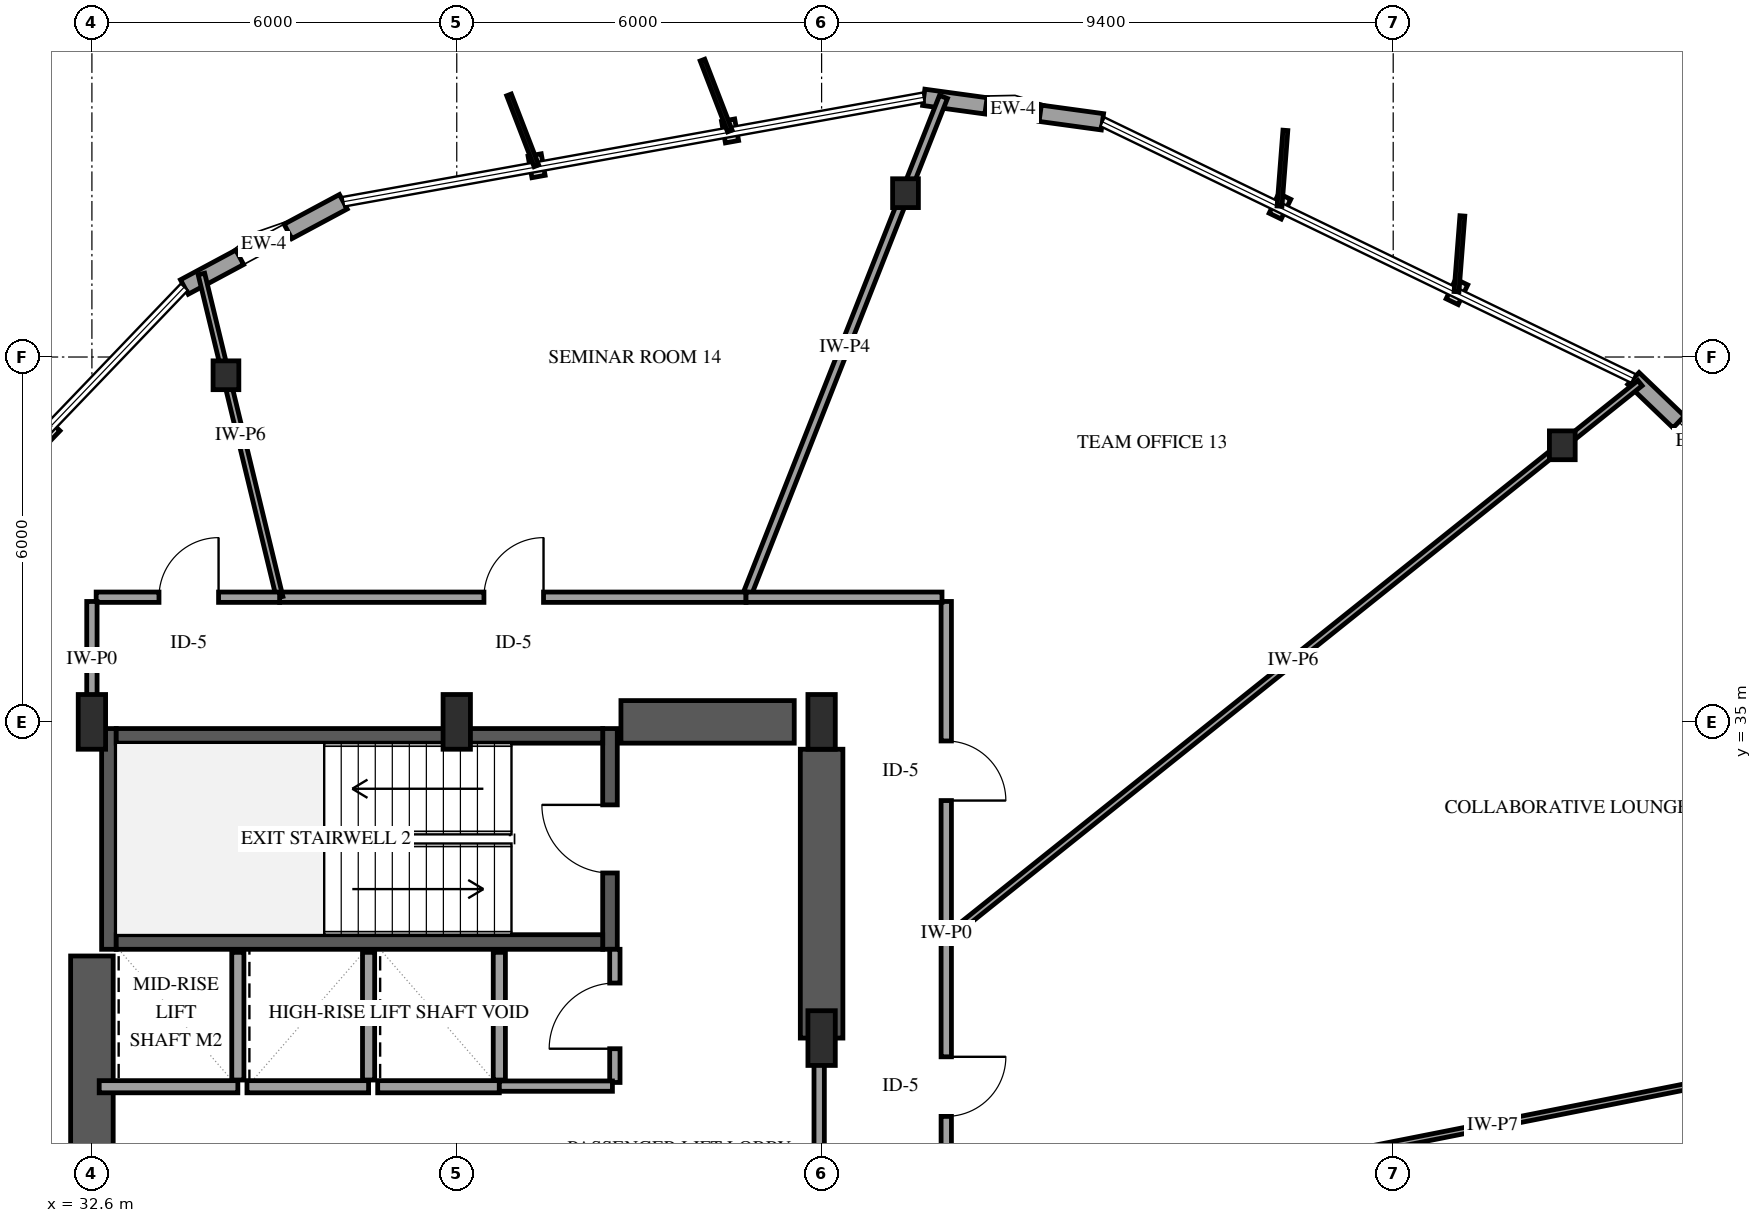
"""IFC4 building model, lengths in metres.
Left out: names, types, materials, properties, quantities, classifications, styles, units other than length and angle.
Written with IfcOpenShell. Run it as: python <this file> out.ifc"""

import sys

from ifc_helpers import new_model, si_unit, direction, frame, frame_2d, origin, origin_2d, place, context, subcontext, project, spatial, rectangle, i_section, extrude, element, fill, save


model = new_model("IFC4")
c1 = context("Model", 3, precision=1e-05, world=origin(), true_north=direction((0.0, 1.0)))
c2 = subcontext(c1, "Body", "Model", "MODEL_VIEW")
j1 = project(units=[si_unit("LENGTHUNIT", "METRE"), si_unit("PLANEANGLEUNIT", "RADIAN")], contexts=[c1])
p1 = place(None, origin())
s1 = spatial("IfcSite", under=j1, at=p1, CompositionType="ELEMENT")
p2 = place(p1, origin())
s2 = spatial("IfcBuilding", under=s1, at=p2, CompositionType="ELEMENT")
p3 = place(p2, frame((0.0, 0.0, 66.6)))
s3 = spatial("IfcBuildingStorey", under=s2, at=p3, CompositionType="ELEMENT", Elevation=66.6)
p4 = place(p3, frame((32.88, 31.26, 0.0), z_axis=(0.0, 0.0, 1.0), x_axis=(0.0, 1.0, 0.0)))
e1 = element("IfcWall", 1, at=p4, inside=s3, PredefinedType="SHEAR", context=c2, shape_type="SweptSolid", body=[
    extrude(rectangle(XDim=3.63, YDim=0.24, at=frame_2d((1.815, 0.0))), origin(), (0.0, 0.0, 1.0), 4.0),
])
p5 = place(p3, frame((41.12, 31.26, 0.0), z_axis=(0.0, 0.0, 1.0), x_axis=(0.0, 1.0, 0.0)))
e2 = element("IfcWall", 2, at=p5, inside=s3, PredefinedType="SHEAR", context=c2, shape_type="SweptSolid", body=[
    extrude(rectangle(XDim=3.63, YDim=0.24, at=frame_2d((1.815, 0.0))), origin(), (0.0, 0.0, 1.0), 4.0),
])
p6 = place(p5, frame((1.255, 0.0, 0.0)))
e3 = element("IfcOpeningElement", 3, at=p6, cuts=e2, PredefinedType="OPENING", context=c2, shape_type="SweptSolid", body=[
    extrude(rectangle(XDim=1.12, YDim=2.15, at=frame_2d((0.56, 1.075))), frame((0.0, 0.13, 0.0), z_axis=(0.0, -1.0, 0.0), x_axis=(1.0, 0.0, 0.0)), (0.0, 0.0, 1.0), 0.26),
])
for number, where, z_axis, x_axis in (
    (4, (33.0, 31.38, 0.0), (0.0, 0.0, 1.0), (1.0, 0.0, 0.0)),
    (5, (33.0, 34.77, 0.0), (0.0, 0.0, 1.0), (1.0, 0.0, 0.0)),
):
    element("IfcWall", number, at=place(p3, frame(where, z_axis=z_axis, x_axis=x_axis)), inside=s3, PredefinedType="SHEAR", context=c2, shape_type="SweptSolid", body=[
        extrude(rectangle(XDim=8.0, YDim=0.24, at=frame_2d((4.0, 0.0))), origin(), (0.0, 0.0, 1.0), 4.0),
    ])
p7 = place(p3, frame((32.6, 18.85, 0.0), z_axis=(0.0, 0.0, 1.0), x_axis=(0.0, 1.0, 0.0)))
e6 = element("IfcWall", 6, at=p7, inside=s3, PredefinedType="SHEAR", context=c2, shape_type="SweptSolid", body=[
    extrude(rectangle(XDim=12.3, YDim=0.7, at=frame_2d((6.15, 0.0))), origin(), (0.0, 0.0, 1.0), 4.0),
])
p8 = place(p3, frame((41.3, 35.0, 0.0), z_axis=(0.0, 0.0, 1.0), x_axis=(1.0, 0.0, 0.0)))
e7 = element("IfcWall", 7, at=p8, inside=s3, PredefinedType="SHEAR", context=c2, shape_type="SweptSolid", body=[
    extrude(rectangle(XDim=2.85, YDim=0.7, at=frame_2d((1.425, 0.0))), origin(), (0.0, 0.0, 1.0), 4.0),
])
p9 = place(p3, frame((44.6, 29.8, 0.0), z_axis=(0.0, 0.0, 1.0), x_axis=(0.0, 1.0, 0.0)))
e8 = element("IfcWall", 8, at=p9, inside=s3, PredefinedType="SHEAR", context=c2, shape_type="SweptSolid", body=[
    extrude(rectangle(XDim=4.75, YDim=0.7, at=frame_2d((2.375, 0.0))), origin(), (0.0, 0.0, 1.0), 4.0),
])
for number, where, z_axis, x_axis in (
    (9, (32.6, 35.0, 0.0), (0.0, 0.0, 1.0), (1.0, 0.0, 0.0)),
    (10, (38.6, 35.0, 0.0), (0.0, 0.0, 1.0), (1.0, 0.0, 0.0)),
    (11, (44.6, 29.8, 0.0), (0.0, 0.0, 1.0), (1.0, 0.0, 0.0)),
    (12, (44.6, 35.0, 0.0), (0.0, 0.0, 1.0), (1.0, 0.0, 0.0)),
):
    element("IfcColumn", number, at=place(p3, frame(where, z_axis=z_axis, x_axis=x_axis)), inside=s3, PredefinedType="PILASTER", context=c2, shape_type="SweptSolid", body=[
        extrude(rectangle(XDim=0.45, YDim=0.9, at=origin_2d()), origin(), (0.0, 0.0, 1.0), 4.0),
    ])
for number, where, z_axis, x_axis in (
    (13, (56.781, 39.548, 0.0), (0.0, 0.0, 1.0), (1.0, 0.0, 0.0)),
    (14, (45.98, 43.694, 0.0), (0.0, 0.0, 1.0), (1.0, 0.0, 0.0)),
    (15, (34.804, 40.7, 0.0), (0.0, 0.0, 1.0), (1.0, 0.0, 0.0)),
):
    element("IfcColumn", number, at=place(p3, frame(where, z_axis=z_axis, x_axis=x_axis)), inside=s3, PredefinedType="COLUMN", context=c2, shape_type="SweptSolid", body=[
        extrude(i_section(OverallWidth=0.424, OverallDepth=0.474, WebThickness=0.048, FlangeThickness=0.077, FilletRadius=0.038, at=origin_2d()), origin(), (0.0, 0.0, 1.0), 4.0),
    ])
p10 = place(p3, frame((60.091, 38.594, 0.0), z_axis=(0.0, 0.0, 1.0), x_axis=(-0.721765475307, 0.69213770209, 0.0)))
e16 = element("IfcWall", 16, at=p10, inside=s3, PredefinedType="SOLIDWALL", context=c2, shape_type="SweptSolid", body=[
    extrude(rectangle(XDim=2.967, YDim=0.27, at=frame_2d((1.483, 0.0))), origin(), (0.0, 0.0, 1.0), 3.079),
])
p11 = place(p10, frame((1.033, 0.0, 0.75)))
e17 = element("IfcOpeningElement", 17, at=p11, cuts=e16, PredefinedType="OPENING", context=c2, shape_type="SweptSolid", body=[
    extrude(rectangle(XDim=0.9, YDim=1.5, at=frame_2d((0.45, 0.75))), frame((0.0, 0.145, 0.0), z_axis=(0.0, -1.0, 0.0), x_axis=(1.0, 0.0, 0.0)), (0.0, 0.0, 1.0), 0.29),
])
p12 = place(p3, frame((49.219, 44.868, 0.0), z_axis=(0.0, 0.0, 1.0), x_axis=(-0.990749365916, 0.13570443595, 0.0)))
e18 = element("IfcWall", 18, at=p12, inside=s3, PredefinedType="SOLIDWALL", context=c2, shape_type="SweptSolid", body=[
    extrude(rectangle(XDim=2.967, YDim=0.27, at=frame_2d((1.483, 0.0))), origin(), (0.0, 0.0, 1.0), 3.079),
])
p13 = place(p12, frame((1.033, 0.0, 0.75)))
e19 = element("IfcOpeningElement", 19, at=p13, cuts=e18, PredefinedType="OPENING", context=c2, shape_type="SweptSolid", body=[
    extrude(rectangle(XDim=0.9, YDim=1.5, at=frame_2d((0.45, 0.75))), frame((0.0, 0.145, 0.0), z_axis=(0.0, -1.0, 0.0), x_axis=(1.0, 0.0, 0.0)), (0.0, 0.0, 1.0), 0.29),
])
p14 = place(p3, frame((36.735, 43.553, 0.0), z_axis=(0.0, 0.0, 1.0), x_axis=(-0.881307407795, -0.47254338739, 0.0)))
e20 = element("IfcWall", 20, at=p14, inside=s3, PredefinedType="SOLIDWALL", context=c2, shape_type="SweptSolid", body=[
    extrude(rectangle(XDim=2.967, YDim=0.27, at=frame_2d((1.483, 0.0))), origin(), (0.0, 0.0, 1.0), 3.079),
])
p15 = place(p14, frame((1.033, 0.0, 0.75)))
e21 = element("IfcOpeningElement", 21, at=p15, cuts=e20, PredefinedType="OPENING", context=c2, shape_type="SweptSolid", body=[
    extrude(rectangle(XDim=0.9, YDim=1.5, at=frame_2d((0.45, 0.75))), frame((0.0, 0.145, 0.0), z_axis=(0.0, -1.0, 0.0), x_axis=(1.0, 0.0, 0.0)), (0.0, 0.0, 1.0), 0.29),
])
p16 = place(p3, frame((32.72, 29.0, 0.0), z_axis=(0.0, 0.0, 1.0), x_axis=(1.0, 0.0, 0.0)))
e22 = element("IfcWall", 22, at=p16, inside=s3, PredefinedType="SOLIDWALL", context=c2, shape_type="SweptSolid", body=[
    extrude(rectangle(XDim=2.28, YDim=0.2, at=frame_2d((1.14, 0.0))), origin(), (0.0, 0.0, 1.0), 3.7),
])
p17 = place(p3, frame((35.0, 29.11, 0.0), z_axis=(0.0, 0.0, 1.0), x_axis=(0.0, 1.0, 0.0)))
e23 = element("IfcWall", 23, at=p17, inside=s3, PredefinedType="SOLIDWALL", context=c2, shape_type="SweptSolid", body=[
    extrude(rectangle(XDim=2.1, YDim=0.2, at=frame_2d((1.05, 0.0))), origin(), (0.0, 0.0, 1.0), 3.7),
])
p18 = place(p3, frame((35.15, 29.0, 0.0), z_axis=(0.0, 0.0, 1.0), x_axis=(1.0, 0.0, 0.0)))
e24 = element("IfcWall", 24, at=p18, inside=s3, PredefinedType="SOLIDWALL", context=c2, shape_type="SweptSolid", body=[
    extrude(rectangle(XDim=2.0, YDim=0.2, at=frame_2d((1.0, 0.0))), origin(), (0.0, 0.0, 1.0), 3.7),
])
p19 = place(p3, frame((37.15, 29.11, 0.0), z_axis=(0.0, 0.0, 1.0), x_axis=(0.0, 1.0, 0.0)))
e25 = element("IfcWall", 25, at=p19, inside=s3, PredefinedType="SOLIDWALL", context=c2, shape_type="SweptSolid", body=[
    extrude(rectangle(XDim=2.1, YDim=0.2, at=frame_2d((1.05, 0.0))), origin(), (0.0, 0.0, 1.0), 3.7),
])
p20 = place(p3, frame((37.3, 29.0, 0.0), z_axis=(0.0, 0.0, 1.0), x_axis=(1.0, 0.0, 0.0)))
e26 = element("IfcWall", 26, at=p20, inside=s3, PredefinedType="SOLIDWALL", context=c2, shape_type="SweptSolid", body=[
    extrude(rectangle(XDim=2.0, YDim=0.2, at=frame_2d((1.0, 0.0))), origin(), (0.0, 0.0, 1.0), 3.7),
])
p21 = place(p3, frame((39.3, 29.11, 0.0), z_axis=(0.0, 0.0, 1.0), x_axis=(0.0, 1.0, 0.0)))
e27 = element("IfcWall", 27, at=p21, inside=s3, PredefinedType="SOLIDWALL", context=c2, shape_type="SweptSolid", body=[
    extrude(rectangle(XDim=2.1, YDim=0.2, at=frame_2d((1.05, 0.0))), origin(), (0.0, 0.0, 1.0), 3.7),
])
p22 = place(p3, frame((46.65, 26.593, 0.0), z_axis=(0.0, 0.0, 1.0), x_axis=(0.980976457062, 0.194126738728, 0.0)))
e28 = element("IfcWall", 28, at=p22, inside=s3, PredefinedType="PARTITIONING", context=c2, shape_type="SweptSolid", body=[
    extrude(rectangle(XDim=18.317, YDim=0.1, at=frame_2d((9.159, 0.0))), origin(), (0.0, 0.0, 1.0), 2.995),
])
p23 = place(p3, frame((46.65, 31.442, 0.0), z_axis=(0.0, 0.0, 1.0), x_axis=(0.780808493208, 0.624770435387, 0.0)))
e29 = element("IfcWall", 29, at=p23, inside=s3, PredefinedType="PARTITIONING", context=c2, shape_type="SweptSolid", body=[
    extrude(rectangle(XDim=14.612, YDim=0.11, at=frame_2d((7.306, 0.0))), origin(), (0.0, 0.0, 1.0), 3.7),
])
p24 = place(p3, frame((43.357, 37.05, 0.0), z_axis=(0.0, 0.0, 1.0), x_axis=(0.367122541211, 0.930172585994, 0.0)))
e30 = element("IfcWall", 30, at=p24, inside=s3, PredefinedType="PARTITIONING", context=c2, shape_type="SweptSolid", body=[
    extrude(rectangle(XDim=8.845, YDim=0.14, at=frame_2d((4.422, 0.0))), origin(), (0.0, 0.0, 1.0), 2.995),
])
p25 = place(p3, frame((35.687, 37.05, 0.0), z_axis=(0.0, 0.0, 1.0), x_axis=(1.0, 0.0, 0.0)))
e31 = element("IfcWall", 31, at=p25, inside=s3, PredefinedType="PARTITIONING", context=c2, shape_type="SweptSolid", body=[
    extrude(rectangle(XDim=7.67, YDim=0.17, at=frame_2d((3.835, 0.0))), origin(), (0.0, 0.0, 1.0), 3.7),
])
p26 = place(p25, frame((3.36, 0.0, 0.0)))
e32 = element("IfcOpeningElement", 32, at=p26, cuts=e31, PredefinedType="OPENING", context=c2, shape_type="SweptSolid", body=[
    extrude(rectangle(XDim=0.98, YDim=2.15, at=frame_2d((0.49, 1.075))), frame((0.0, 0.095, 0.0), z_axis=(0.0, -1.0, 0.0), x_axis=(1.0, 0.0, 0.0)), (0.0, 0.0, 1.0), 0.19),
])
p27 = place(p3, frame((44.56, 29.8, 0.0), z_axis=(0.0, 0.0, 1.0), x_axis=(0.0, -1.0, 0.0)))
e33 = element("IfcWall", 33, at=p27, inside=s3, PredefinedType="PARTITIONING", context=c2, shape_type="SweptSolid", body=[
    extrude(rectangle(XDim=6.91, YDim=0.17, at=frame_2d((3.455, 0.0))), origin(), (0.0, 0.0, 1.0), 2.74),
])
p28 = place(p27, frame((2.915, 0.0, 0.0)))
e34 = element("IfcOpeningElement", 34, at=p28, cuts=e33, PredefinedType="OPENING", context=c2, shape_type="SweptSolid", body=[
    extrude(rectangle(XDim=1.08, YDim=2.15, at=frame_2d((0.54, 1.075))), frame((0.0, 0.095, 0.0), z_axis=(0.0, -1.0, 0.0), x_axis=(1.0, 0.0, 0.0)), (0.0, 0.0, 1.0), 0.19),
])
p29 = place(p3, frame((46.65, 36.98, 0.0), z_axis=(0.0, 0.0, 1.0), x_axis=(0.0, -1.0, 0.0)))
e35 = element("IfcWall", 35, at=p29, inside=s3, PredefinedType="PARTITIONING", context=c2, shape_type="SweptSolid", body=[
    extrude(rectangle(XDim=5.538, YDim=0.17, at=frame_2d((2.769, 0.0))), origin(), (0.0, 0.0, 1.0), 3.7),
])
p30 = place(p29, frame((2.294, 0.0, 0.0)))
e36 = element("IfcOpeningElement", 36, at=p30, cuts=e35, PredefinedType="OPENING", context=c2, shape_type="SweptSolid", body=[
    extrude(rectangle(XDim=0.98, YDim=2.15, at=frame_2d((0.49, 1.075))), frame((0.0, 0.095, 0.0), z_axis=(0.0, -1.0, 0.0), x_axis=(1.0, 0.0, 0.0)), (0.0, 0.0, 1.0), 0.19),
])
p31 = place(p3, frame((35.687, 37.05, 0.0), z_axis=(0.0, 0.0, 1.0), x_axis=(-0.235196214619, 0.97194791045, 0.0)))
e37 = element("IfcWall", 37, at=p31, inside=s3, PredefinedType="PARTITIONING", context=c2, shape_type="SweptSolid", body=[
    extrude(rectangle(XDim=5.468, YDim=0.11, at=frame_2d((2.734, 0.0))), origin(), (0.0, 0.0, 1.0), 2.995),
])
p32 = place(p3, frame((46.65, 31.442, 0.0), z_axis=(0.0, 0.0, 1.0), x_axis=(0.0, -1.0, 0.0)))
e38 = element("IfcWall", 38, at=p32, inside=s3, PredefinedType="PARTITIONING", context=c2, shape_type="SweptSolid", body=[
    extrude(rectangle(XDim=4.849, YDim=0.17, at=frame_2d((2.424, 0.0))), origin(), (0.0, 0.0, 1.0), 3.7),
])
p33 = place(p32, frame((1.95, 0.0, 0.0)))
e39 = element("IfcOpeningElement", 39, at=p33, cuts=e38, PredefinedType="OPENING", context=c2, shape_type="SweptSolid", body=[
    extrude(rectangle(XDim=0.98, YDim=2.15, at=frame_2d((0.49, 1.075))), frame((0.0, 0.095, 0.0), z_axis=(0.0, -1.0, 0.0), x_axis=(1.0, 0.0, 0.0)), (0.0, 0.0, 1.0), 0.19),
])
p34 = place(p3, frame((43.357, 37.05, 0.0), z_axis=(0.0, 0.0, 1.0), x_axis=(1.0, 0.0, 0.0)))
e40 = element("IfcWall", 40, at=p34, inside=s3, PredefinedType="PARTITIONING", context=c2, shape_type="SweptSolid", body=[
    extrude(rectangle(XDim=3.223, YDim=0.17, at=frame_2d((1.612, 0.0))), origin(), (0.0, 0.0, 1.0), 3.7),
])
p35 = place(p3, frame((32.67, 37.05, 0.0), z_axis=(0.0, 0.0, 1.0), x_axis=(1.0, 0.0, 0.0)))
e41 = element("IfcWall", 41, at=p35, inside=s3, PredefinedType="PARTITIONING", context=c2, shape_type="SweptSolid", body=[
    extrude(rectangle(XDim=3.017, YDim=0.17, at=frame_2d((1.509, 0.0))), origin(), (0.0, 0.0, 1.0), 3.7),
])
p36 = place(p35, frame((1.033, 0.0, 0.0)))
e42 = element("IfcOpeningElement", 42, at=p36, cuts=e41, PredefinedType="OPENING", context=c2, shape_type="SweptSolid", body=[
    extrude(rectangle(XDim=0.98, YDim=2.15, at=frame_2d((0.49, 1.075))), frame((0.0, 0.095, 0.0), z_axis=(0.0, -1.0, 0.0), x_axis=(1.0, 0.0, 0.0)), (0.0, 0.0, 1.0), 0.19),
])
p37 = place(p3, frame((41.2, 29.07, 0.0), z_axis=(0.0, 0.0, 1.0), x_axis=(0.0, 1.0, 0.0)))
e43 = element("IfcWall", 43, at=p37, inside=s3, PredefinedType="PARTITIONING", context=c2, shape_type="SweptSolid", body=[
    extrude(rectangle(XDim=2.19, YDim=0.17, at=frame_2d((1.095, 0.0))), origin(), (0.0, 0.0, 1.0), 3.7),
])
p38 = place(p37, frame((0.555, 0.0, 0.0)))
e44 = element("IfcOpeningElement", 44, at=p38, cuts=e43, PredefinedType="OPENING", context=c2, shape_type="SweptSolid", body=[
    extrude(rectangle(XDim=1.08, YDim=2.15, at=frame_2d((0.54, 1.075))), frame((0.0, 0.095, 0.0), z_axis=(0.0, -1.0, 0.0), x_axis=(1.0, 0.0, 0.0)), (0.0, 0.0, 1.0), 0.19),
])
p39 = place(p3, frame((32.6, 35.07, 0.0), z_axis=(0.0, 0.0, 1.0), x_axis=(0.0, 1.0, 0.0)))
e45 = element("IfcWall", 45, at=p39, inside=s3, PredefinedType="PARTITIONING", context=c2, shape_type="SweptSolid", body=[
    extrude(rectangle(XDim=1.91, YDim=0.17, at=frame_2d((0.955, 0.0))), origin(), (0.0, 0.0, 1.0), 3.7),
])
p40 = place(p3, frame((39.3, 29.01, 0.0), z_axis=(0.0, 0.0, 1.0), x_axis=(1.0, 0.0, 0.0)))
e46 = element("IfcWall", 46, at=p40, inside=s3, PredefinedType="PARTITIONING", context=c2, shape_type="SweptSolid", body=[
    extrude(rectangle(XDim=1.86, YDim=0.17, at=frame_2d((0.93, 0.0))), origin(), (0.0, 0.0, 1.0), 3.7),
])
p41 = place(p11, origin())
e47 = element("IfcWindow", 47, at=p41, inside=s3, PartitioningType="SINGLE_PANEL", PredefinedType="WINDOW", context=c2, shape_type="SweptSolid", body=[
    extrude(rectangle(XDim=0.9, YDim=1.5, at=frame_2d((0.45, 0.75))), frame((0.0, 0.03, 0.0), z_axis=(0.0, -1.0, 0.0), x_axis=(1.0, 0.0, 0.0)), (0.0, 0.0, 1.0), 0.06),
])
fill(e17, e47)
p42 = place(p13, origin())
e48 = element("IfcWindow", 48, at=p42, inside=s3, PartitioningType="SINGLE_PANEL", PredefinedType="WINDOW", context=c2, shape_type="SweptSolid", body=[
    extrude(rectangle(XDim=0.9, YDim=1.5, at=frame_2d((0.45, 0.75))), frame((0.0, 0.03, 0.0), z_axis=(0.0, -1.0, 0.0), x_axis=(1.0, 0.0, 0.0)), (0.0, 0.0, 1.0), 0.06),
])
fill(e19, e48)
p43 = place(p15, origin())
e49 = element("IfcWindow", 49, at=p43, inside=s3, PartitioningType="SINGLE_PANEL", PredefinedType="WINDOW", context=c2, shape_type="SweptSolid", body=[
    extrude(rectangle(XDim=0.9, YDim=1.5, at=frame_2d((0.45, 0.75))), frame((0.0, 0.03, 0.0), z_axis=(0.0, -1.0, 0.0), x_axis=(1.0, 0.0, 0.0)), (0.0, 0.0, 1.0), 0.06),
])
fill(e21, e49)
p44 = place(p6, origin())
e50 = element("IfcDoor", 50, at=p44, inside=s3, OperationType="SINGLE_SWING_RIGHT", PredefinedType="DOOR", context=c2, shape_type="SweptSolid", body=[
    extrude(rectangle(XDim=1.12, YDim=2.15, at=frame_2d((0.56, 1.075))), frame((0.0, 0.025, 0.0), z_axis=(0.0, -1.0, 0.0), x_axis=(1.0, 0.0, 0.0)), (0.0, 0.0, 1.0), 0.05),
])
fill(e3, e50)
p45 = place(p26, origin())
e51 = element("IfcDoor", 51, at=p45, inside=s3, OperationType="SINGLE_SWING_RIGHT", PredefinedType="DOOR", context=c2, shape_type="SweptSolid", body=[
    extrude(rectangle(XDim=0.98, YDim=2.15, at=frame_2d((0.49, 1.075))), frame((0.0, 0.025, 0.0), z_axis=(0.0, -1.0, 0.0), x_axis=(1.0, 0.0, 0.0)), (0.0, 0.0, 1.0), 0.05),
])
fill(e32, e51)
p46 = place(p30, origin())
e52 = element("IfcDoor", 52, at=p46, inside=s3, OperationType="SINGLE_SWING_RIGHT", PredefinedType="DOOR", context=c2, shape_type="SweptSolid", body=[
    extrude(rectangle(XDim=0.98, YDim=2.15, at=frame_2d((0.49, 1.075))), frame((0.0, 0.025, 0.0), z_axis=(0.0, -1.0, 0.0), x_axis=(1.0, 0.0, 0.0)), (0.0, 0.0, 1.0), 0.05),
])
fill(e36, e52)
p47 = place(p33, origin())
e53 = element("IfcDoor", 53, at=p47, inside=s3, OperationType="SINGLE_SWING_LEFT", PredefinedType="DOOR", context=c2, shape_type="SweptSolid", body=[
    extrude(rectangle(XDim=0.98, YDim=2.15, at=frame_2d((0.49, 1.075))), frame((0.0, 0.025, 0.0), z_axis=(0.0, -1.0, 0.0), x_axis=(1.0, 0.0, 0.0)), (0.0, 0.0, 1.0), 0.05),
])
fill(e39, e53)
p48 = place(p36, origin())
e54 = element("IfcDoor", 54, at=p48, inside=s3, OperationType="SINGLE_SWING_RIGHT", PredefinedType="DOOR", context=c2, shape_type="SweptSolid", body=[
    extrude(rectangle(XDim=0.98, YDim=2.15, at=frame_2d((0.49, 1.075))), frame((0.0, 0.025, 0.0), z_axis=(0.0, -1.0, 0.0), x_axis=(1.0, 0.0, 0.0)), (0.0, 0.0, 1.0), 0.05),
])
fill(e42, e54)
p49 = place(p38, origin())
e55 = element("IfcDoor", 55, at=p49, inside=s3, OperationType="SINGLE_SWING_LEFT", PredefinedType="DOOR", context=c2, shape_type="SweptSolid", body=[
    extrude(rectangle(XDim=1.08, YDim=2.15, at=frame_2d((0.54, 1.075))), frame((0.0, 0.025, 0.0), z_axis=(0.0, -1.0, 0.0), x_axis=(1.0, 0.0, 0.0)), (0.0, 0.0, 1.0), 0.05),
])
fill(e44, e55)
save(model, sys.argv[1])
